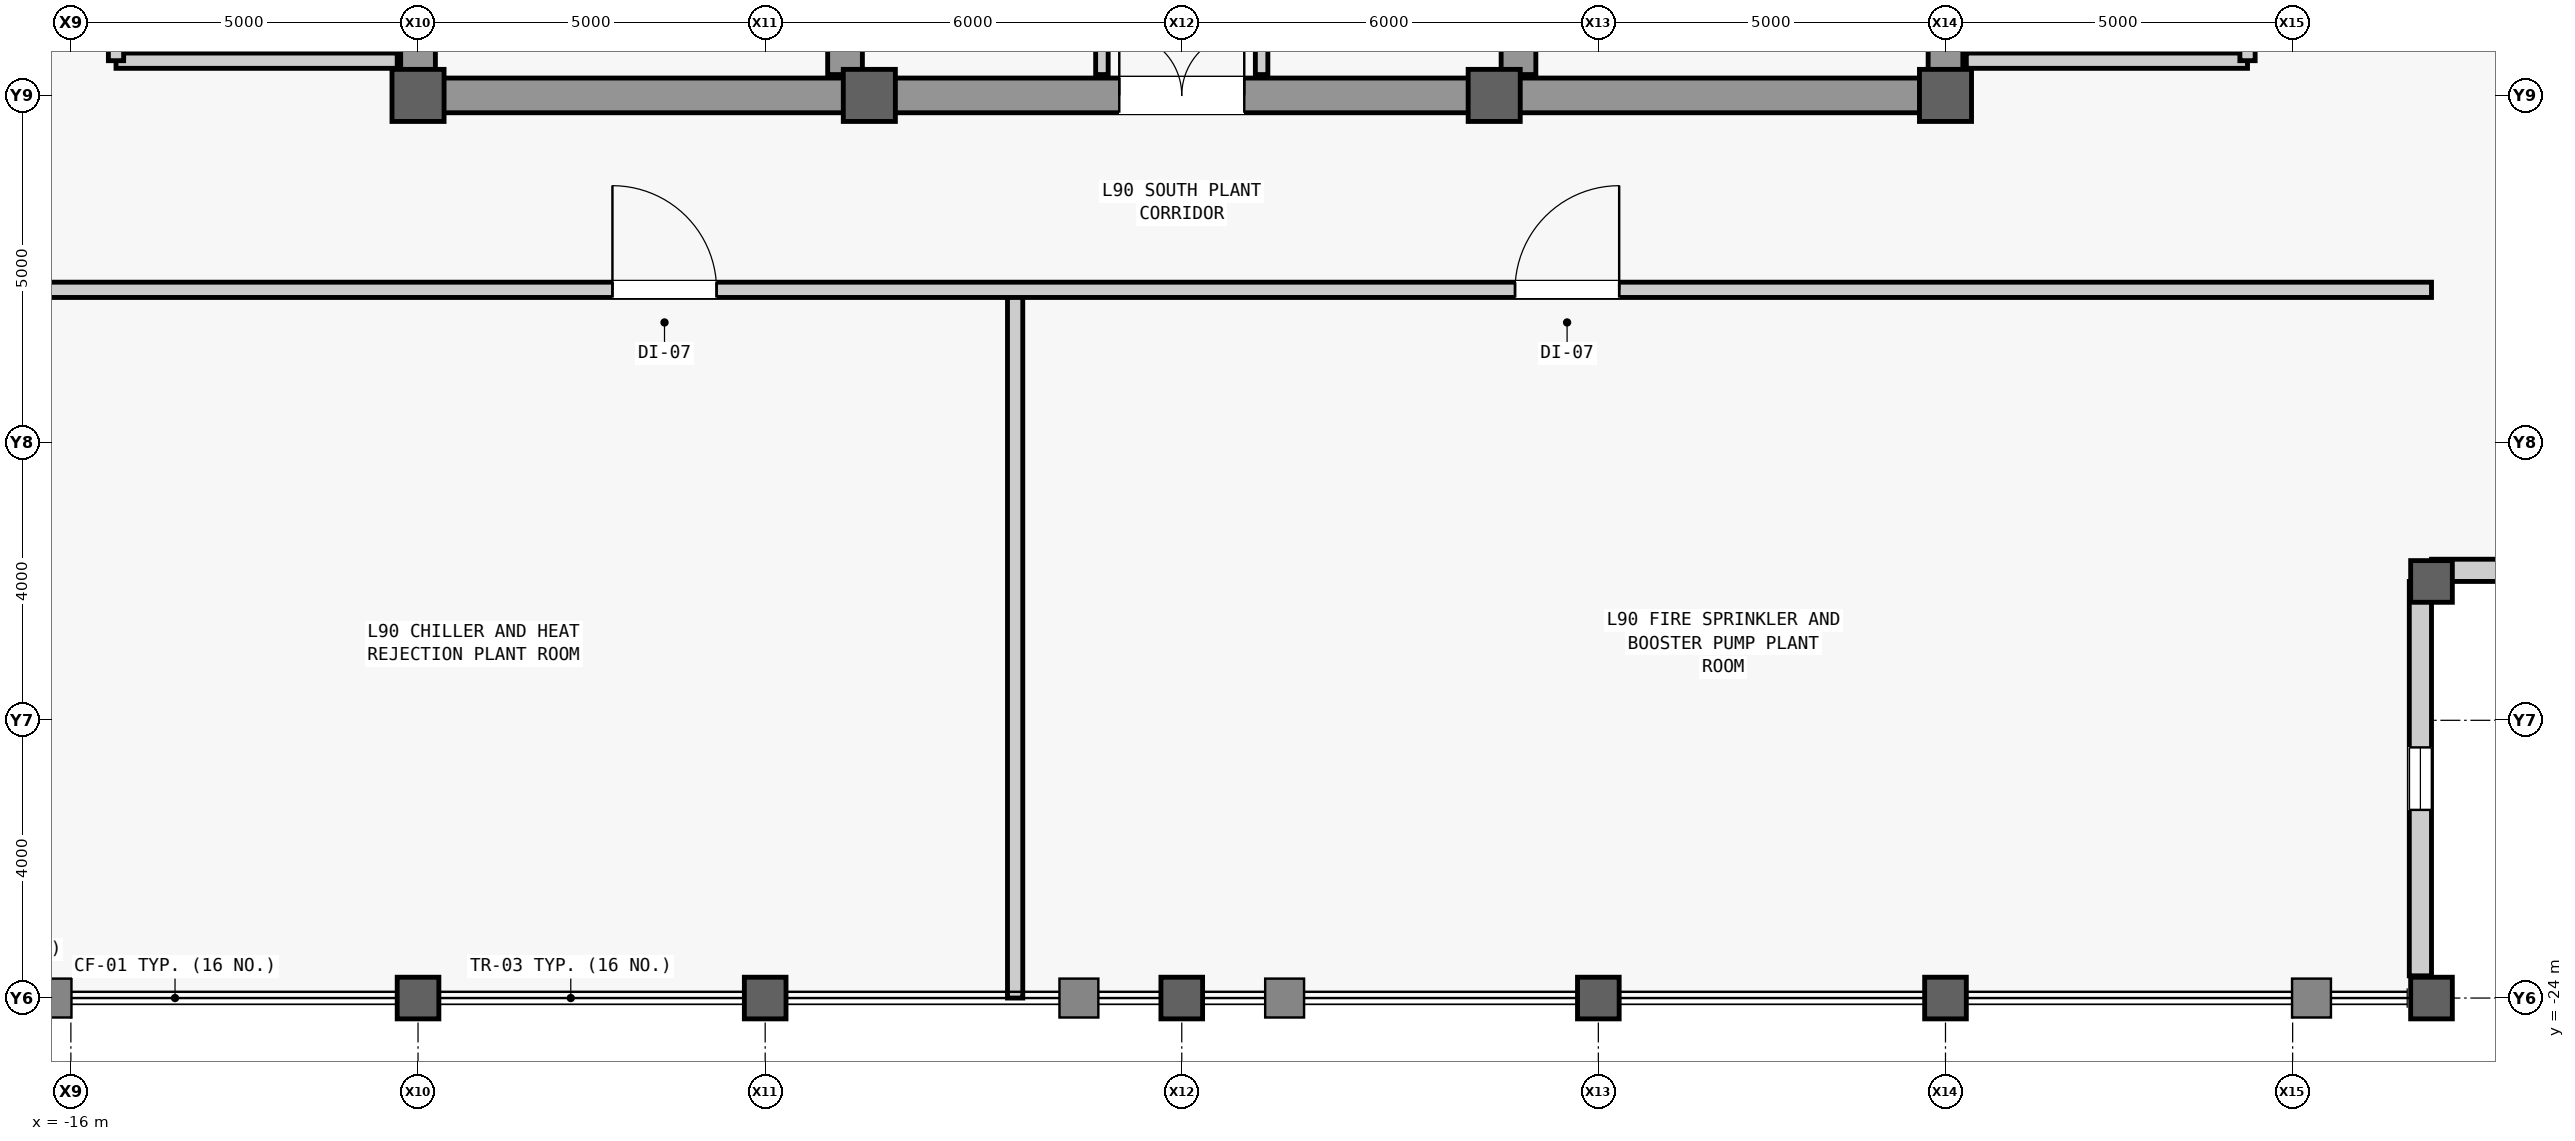
"""IFC4 building model, lengths in metres.
Left out: names, types, materials, properties, quantities, classifications, styles, units other than length and angle.
Written with IfcOpenShell. Run it as: python <this file> out.ifc"""

import sys

from ifc_helpers import new_model, si_unit, direction, frame, frame_2d, origin, origin_2d, place, context, subcontext, project, spatial, rectangle, hollow_rectangle, extrude, source, transform, mapped, element, fill, save


model = new_model("IFC4")
c1 = context("Model", 3, precision=1e-05, world=origin(), true_north=direction((0.0, 1.0)))
c2 = subcontext(c1, "Body", "Model", "MODEL_VIEW")
j1 = project(units=[si_unit("LENGTHUNIT", "METRE"), si_unit("PLANEANGLEUNIT", "RADIAN")], contexts=[c1])
p1 = place(None, origin())
s1 = spatial("IfcSite", under=j1, at=p1, CompositionType="ELEMENT")
p2 = place(p1, origin())
s2 = spatial("IfcBuilding", under=s1, at=p2, CompositionType="ELEMENT")
p3 = place(p2, frame((0.0, 0.0, 380.3)))
s3 = spatial("IfcBuildingStorey", under=s2, at=p3, CompositionType="ELEMENT", Elevation=380.3)
m1 = source(origin(), c2, "Body", "SweptSolid", [
    extrude(rectangle(XDim=22.0, YDim=0.5, at=frame_2d((11.0, 0.0))), origin(), (0.0, 0.0, 1.0), 4.45),
])
p4 = place(p3, frame((-11.0, -11.0, 0.0), z_axis=(0.0, 0.0, 1.0), x_axis=(0.0, 1.0, 0.0)))
e1 = element("IfcWall", 1, at=p4, inside=s3, PredefinedType="SHEAR", context=c2, shape_type="MappedRepresentation", body=[
    mapped(m1, transform((0.0, 0.0, 0.0), scale=1.0)),
])
m2 = source(origin(), c2, "Body", "SweptSolid", [
    extrude(rectangle(XDim=1.1, YDim=2.2, at=frame_2d((0.55, 1.1))), frame((0.0, 0.26, 0.0), z_axis=(0.0, -1.0, 0.0), x_axis=(1.0, 0.0, 0.0)), (0.0, 0.0, 1.0), 0.52),
])
p5 = place(p4, frame((0.8, 0.0, 0.0)))
e2 = element("IfcOpeningElement", 2, at=p5, cuts=e1, PredefinedType="OPENING", context=c2, shape_type="MappedRepresentation", body=[
    mapped(m2, transform((0.0, 0.0, 0.0), scale=1.0)),
])
p6 = place(p4, frame((12.5, 0.0, 0.0)))
e3 = element("IfcOpeningElement", 3, at=p6, cuts=e1, PredefinedType="OPENING", context=c2, shape_type="MappedRepresentation", body=[
    mapped(m2, transform((0.0, 0.0, 0.0), scale=1.0)),
])
m3 = source(origin(), c2, "Body", "SweptSolid", [
    extrude(rectangle(XDim=0.9, YDim=2.15, at=frame_2d((0.45, 1.075))), frame((0.0, 0.26, 0.0), z_axis=(0.0, -1.0, 0.0), x_axis=(1.0, 0.0, 0.0)), (0.0, 0.0, 1.0), 0.52),
])
p7 = place(p4, frame((7.575, 0.0, 0.0)))
e4 = element("IfcOpeningElement", 4, at=p7, cuts=e1, PredefinedType="OPENING", context=c2, shape_type="MappedRepresentation", body=[
    mapped(m3, transform((0.0, 0.0, 0.0), scale=1.0)),
])
m4 = source(origin(), c2, "Body", "SweptSolid", [
    extrude(rectangle(XDim=1.3, YDim=2.3, at=frame_2d((0.65, 1.15))), frame((0.0, 0.26, 0.0), z_axis=(0.0, -1.0, 0.0), x_axis=(1.0, 0.0, 0.0)), (0.0, 0.0, 1.0), 0.52),
])
p8 = place(p4, frame((2.7, 0.0, 0.0)))
e5 = element("IfcOpeningElement", 5, at=p8, cuts=e1, PredefinedType="OPENING", context=c2, shape_type="MappedRepresentation", body=[
    mapped(m4, transform((0.0, 0.0, 0.0), scale=1.0)),
])
p9 = place(p3, frame((11.0, -11.0, 0.0), z_axis=(0.0, 0.0, 1.0), x_axis=(0.0, 1.0, 0.0)))
e6 = element("IfcWall", 6, at=p9, inside=s3, PredefinedType="SHEAR", context=c2, shape_type="MappedRepresentation", body=[
    mapped(m1, transform((0.0, 0.0, 0.0), scale=1.0)),
])
p10 = place(p9, frame((0.8, 0.0, 0.0)))
e7 = element("IfcOpeningElement", 7, at=p10, cuts=e6, PredefinedType="OPENING", context=c2, shape_type="MappedRepresentation", body=[
    mapped(m2, transform((0.0, 0.0, 0.0), scale=1.0)),
])
p11 = place(p9, frame((7.575, 0.0, 0.0)))
e8 = element("IfcOpeningElement", 8, at=p11, cuts=e6, PredefinedType="OPENING", context=c2, shape_type="MappedRepresentation", body=[
    mapped(m3, transform((0.0, 0.0, 0.0), scale=1.0)),
])
p12 = place(p9, frame((2.7, 0.0, 0.0)))
e9 = element("IfcOpeningElement", 9, at=p12, cuts=e6, PredefinedType="OPENING", context=c2, shape_type="MappedRepresentation", body=[
    mapped(m4, transform((0.0, 0.0, 0.0), scale=1.0)),
])
p13 = place(p9, frame((13.35, 0.0, 0.0)))
e10 = element("IfcOpeningElement", 10, at=p13, cuts=e6, PredefinedType="OPENING", context=c2, shape_type="MappedRepresentation", body=[
    mapped(m4, transform((0.0, 0.0, 0.0), scale=1.0)),
])
m5 = source(origin(), c2, "Body", "SweptSolid", [
    extrude(rectangle(XDim=21.4, YDim=0.5, at=frame_2d((10.7, 0.0))), origin(), (0.0, 0.0, 1.0), 4.45),
])
for number, where, z_axis, x_axis in (
    (11, (-4.85, -10.7, 0.0), (0.0, 0.0, 1.0), (0.0, 1.0, 0.0)),
    (12, (4.85, -10.7, 0.0), (0.0, 0.0, 1.0), (0.0, 1.0, 0.0)),
):
    element("IfcWall", number, at=place(p3, frame(where, z_axis=z_axis, x_axis=x_axis)), inside=s3, PredefinedType="SHEAR", context=c2, shape_type="MappedRepresentation", body=[
        mapped(m5, transform((0.0, 0.0, 0.0), scale=1.0)),
    ])
m6 = source(origin(), c2, "Body", "SweptSolid", [
    extrude(rectangle(XDim=5.9, YDim=0.5, at=frame_2d((2.95, 0.0))), origin(), (0.0, 0.0, 1.0), 4.45),
])
for number, where, z_axis, x_axis in (
    (13, (-10.75, -11.0, 0.0), (0.0, 0.0, 1.0), (1.0, 0.0, 0.0)),
    (14, (4.85, -11.0, 0.0), (0.0, 0.0, 1.0), (1.0, 0.0, 0.0)),
):
    element("IfcWall", number, at=place(p3, frame(where, z_axis=z_axis, x_axis=x_axis)), inside=s3, PredefinedType="SHEAR", context=c2, shape_type="MappedRepresentation", body=[
        mapped(m6, transform((0.0, 0.0, 0.0), scale=1.0)),
    ])
m7 = source(origin(), c2, "Body", "SweptSolid", [
    extrude(rectangle(XDim=9.2, YDim=0.5, at=frame_2d((4.6, 0.0))), origin(), (0.0, 0.0, 1.0), 4.45),
])
p14 = place(p3, frame((-4.6, -11.0, 0.0), z_axis=(0.0, 0.0, 1.0), x_axis=(1.0, 0.0, 0.0)))
e15 = element("IfcWall", 15, at=p14, inside=s3, PredefinedType="SHEAR", context=c2, shape_type="MappedRepresentation", body=[
    mapped(m7, transform((0.0, 0.0, 0.0), scale=1.0)),
])
m8 = source(origin(), c2, "Body", "SweptSolid", [
    extrude(rectangle(XDim=1.8, YDim=2.25, at=frame_2d((0.9, 1.125))), frame((0.0, 0.26, 0.0), z_axis=(0.0, -1.0, 0.0), x_axis=(1.0, 0.0, 0.0)), (0.0, 0.0, 1.0), 0.52),
])
p15 = place(p14, frame((3.7, 0.0, 0.0)))
e16 = element("IfcOpeningElement", 16, at=p15, cuts=e15, PredefinedType="OPENING", context=c2, shape_type="MappedRepresentation", body=[
    mapped(m8, transform((0.0, 0.0, 0.0), scale=1.0)),
])
m9 = source(origin(), c2, "Body", "SweptSolid", [
    extrude(hollow_rectangle(XDim=0.6, YDim=0.6, WallThickness=0.035, at=origin_2d()), origin(), (0.0, 0.0, 1.0), 4.8),
])
p16 = place(p3, frame((-11.0, -24.0, 0.0), z_axis=(0.0, 0.0, 1.0), x_axis=(1.0, 0.0, 0.0)))
e17 = element("IfcColumn", 17, at=p16, inside=s3, PredefinedType="COLUMN", context=c2, shape_type="MappedRepresentation", body=[
    mapped(m9, transform((0.0, 0.0, 0.0), scale=1.0)),
])
m10 = source(origin(), c2, "Body", "SweptSolid", [
    extrude(rectangle(XDim=0.75, YDim=0.75, at=origin_2d()), origin(), (0.0, 0.0, 1.0), 4.8),
])
p17 = place(p3, frame((-11.0, -11.0, 0.0), z_axis=(0.0, 0.0, 1.0), x_axis=(1.0, 0.0, 0.0)))
e18 = element("IfcColumn", 18, at=p17, inside=s3, PredefinedType="COLUMN", context=c2, shape_type="MappedRepresentation", body=[
    mapped(m10, transform((0.0, 0.0, 0.0), scale=1.0)),
])
p18 = place(p3, frame((-6.0, -24.0, 0.0), z_axis=(0.0, 0.0, 1.0), x_axis=(1.0, 0.0, 0.0)))
e19 = element("IfcColumn", 19, at=p18, inside=s3, PredefinedType="COLUMN", context=c2, shape_type="MappedRepresentation", body=[
    mapped(m9, transform((0.0, 0.0, 0.0), scale=1.0)),
])
p19 = place(p3, frame((-4.5, -11.0, 0.0), z_axis=(0.0, 0.0, 1.0), x_axis=(1.0, 0.0, 0.0)))
e20 = element("IfcColumn", 20, at=p19, inside=s3, PredefinedType="COLUMN", context=c2, shape_type="MappedRepresentation", body=[
    mapped(m10, transform((0.0, 0.0, 0.0), scale=1.0)),
])
p20 = place(p3, frame((0.0, -24.0, 0.0), z_axis=(0.0, 0.0, 1.0), x_axis=(1.0, 0.0, 0.0)))
e21 = element("IfcColumn", 21, at=p20, inside=s3, PredefinedType="COLUMN", context=c2, shape_type="MappedRepresentation", body=[
    mapped(m9, transform((0.0, 0.0, 0.0), scale=1.0)),
])
p21 = place(p3, frame((4.5, -11.0, 0.0), z_axis=(0.0, 0.0, 1.0), x_axis=(1.0, 0.0, 0.0)))
e22 = element("IfcColumn", 22, at=p21, inside=s3, PredefinedType="COLUMN", context=c2, shape_type="MappedRepresentation", body=[
    mapped(m10, transform((0.0, 0.0, 0.0), scale=1.0)),
])
for number, where, z_axis, x_axis in (
    (23, (6.0, -24.0, 0.0), (0.0, 0.0, 1.0), (1.0, 0.0, 0.0)),
    (24, (11.0, -24.0, 0.0), (0.0, 0.0, 1.0), (1.0, 0.0, 0.0)),
):
    element("IfcColumn", number, at=place(p3, frame(where, z_axis=z_axis, x_axis=x_axis)), inside=s3, PredefinedType="COLUMN", context=c2, shape_type="MappedRepresentation", body=[
        mapped(m9, transform((0.0, 0.0, 0.0), scale=1.0)),
    ])
p22 = place(p3, frame((11.0, -11.0, 0.0), z_axis=(0.0, 0.0, 1.0), x_axis=(1.0, 0.0, 0.0)))
e25 = element("IfcColumn", 25, at=p22, inside=s3, PredefinedType="COLUMN", context=c2, shape_type="MappedRepresentation", body=[
    mapped(m10, transform((0.0, 0.0, 0.0), scale=1.0)),
])
for number, where, z_axis, x_axis in (
    (26, (18.0, -24.0, 0.0), (0.0, 0.0, 1.0), (1.0, 0.0, 0.0)),
    (27, (18.0, -18.0, 0.0), (0.0, 0.0, 1.0), (1.0, 0.0, 0.0)),
):
    element("IfcColumn", number, at=place(p3, frame(where, z_axis=z_axis, x_axis=x_axis)), inside=s3, PredefinedType="COLUMN", context=c2, shape_type="MappedRepresentation", body=[
        mapped(m9, transform((0.0, 0.0, 0.0), scale=1.0)),
    ])
m11 = source(origin(), c2, "Body", "SweptSolid", [
    extrude(rectangle(XDim=5.68, YDim=0.32, at=frame_2d((2.84, 0.0))), origin(), (0.0, 0.0, 1.0), 3.901),
])
p23 = place(p3, frame((17.84, -23.68, 0.0), z_axis=(0.0, 0.0, 1.0), x_axis=(0.0, 1.0, 0.0)))
e28 = element("IfcWall", 28, at=p23, inside=s3, PredefinedType="STANDARD", context=c2, shape_type="MappedRepresentation", body=[
    mapped(m11, transform((0.0, 0.0, 0.0), scale=1.0)),
])
m12 = source(origin(), c2, "Body", "SweptSolid", [
    extrude(rectangle(XDim=0.9, YDim=2.4, at=frame_2d((0.45, 1.2))), frame((0.0, 0.17, 0.0), z_axis=(0.0, -1.0, 0.0), x_axis=(1.0, 0.0, 0.0)), (0.0, 0.0, 1.0), 0.34),
])
p24 = place(p23, frame((2.39, 0.0, 0.7)))
e29 = element("IfcOpeningElement", 29, at=p24, cuts=e28, PredefinedType="OPENING", context=c2, shape_type="MappedRepresentation", body=[
    mapped(m12, transform((0.0, 0.0, 0.0), scale=1.0)),
])
p25 = place(p3, frame((18.0, -17.84, 0.0), z_axis=(0.0, 0.0, 1.0), x_axis=(1.0, 0.0, 0.0)))
e30 = element("IfcWall", 30, at=p25, inside=s3, PredefinedType="STANDARD", context=c2, shape_type="MappedRepresentation", body=[
    mapped(m11, transform((0.0, 0.0, 0.0), scale=1.0)),
])
p26 = place(p25, frame((2.39, 0.0, 0.7)))
e31 = element("IfcOpeningElement", 31, at=p26, cuts=e30, PredefinedType="OPENING", context=c2, shape_type="MappedRepresentation", body=[
    mapped(m12, transform((0.0, 0.0, 0.0), scale=1.0)),
])
m13 = source(origin(), c2, "Body", "SweptSolid", [
    extrude(rectangle(XDim=4.05, YDim=0.22, at=frame_2d((2.025, 0.0))), origin(), (0.0, 0.0, 1.0), 4.45),
])
p27 = place(p3, frame((-15.35, -10.5, 0.0), z_axis=(0.0, 0.0, 1.0), x_axis=(1.0, 0.0, 0.0)))
e32 = element("IfcWall", 32, at=p27, inside=s3, PredefinedType="PARTITIONING", context=c2, shape_type="MappedRepresentation", body=[
    mapped(m13, transform((0.0, 0.0, 0.0), scale=1.0)),
])
m14 = source(origin(), c2, "Body", "SweptSolid", [
    extrude(rectangle(XDim=4.4, YDim=0.22, at=frame_2d((2.2, 0.0))), origin(), (0.0, 0.0, 1.0), 4.45),
])
p28 = place(p3, frame((-15.35, -10.5, 0.0), z_axis=(0.0, 0.0, 1.0), x_axis=(0.0, 1.0, 0.0)))
e33 = element("IfcWall", 33, at=p28, inside=s3, PredefinedType="PARTITIONING", context=c2, shape_type="MappedRepresentation", body=[
    mapped(m14, transform((0.0, 0.0, 0.0), scale=1.0)),
])
m15 = source(origin(), c2, "Body", "SweptSolid", [
    extrude(rectangle(XDim=1.2, YDim=2.2, at=frame_2d((0.6, 1.1))), frame((0.0, 0.12, 0.0), z_axis=(0.0, -1.0, 0.0), x_axis=(1.0, 0.0, 0.0)), (0.0, 0.0, 1.0), 0.24),
])
p29 = place(p28, frame((1.6, 0.0, 0.0)))
e34 = element("IfcOpeningElement", 34, at=p29, cuts=e33, PredefinedType="OPENING", context=c2, shape_type="MappedRepresentation", body=[
    mapped(m15, transform((0.0, 0.0, 0.0), scale=1.0)),
])
p30 = place(p3, frame((11.3, -10.5, 0.0), z_axis=(0.0, 0.0, 1.0), x_axis=(1.0, 0.0, 0.0)))
e35 = element("IfcWall", 35, at=p30, inside=s3, PredefinedType="PARTITIONING", context=c2, shape_type="MappedRepresentation", body=[
    mapped(m13, transform((0.0, 0.0, 0.0), scale=1.0)),
])
p31 = place(p3, frame((15.35, -10.5, 0.0), z_axis=(0.0, 0.0, 1.0), x_axis=(0.0, 1.0, 0.0)))
e36 = element("IfcWall", 36, at=p31, inside=s3, PredefinedType="PARTITIONING", context=c2, shape_type="MappedRepresentation", body=[
    mapped(m14, transform((0.0, 0.0, 0.0), scale=1.0)),
])
p32 = place(p31, frame((1.6, 0.0, 0.0)))
e37 = element("IfcOpeningElement", 37, at=p32, cuts=e36, PredefinedType="OPENING", context=c2, shape_type="MappedRepresentation", body=[
    mapped(m15, transform((0.0, 0.0, 0.0), scale=1.0)),
])
m16 = source(origin(), c2, "Body", "SweptSolid", [
    extrude(rectangle(XDim=5.4, YDim=0.18, at=frame_2d((2.7, 0.0))), origin(), (0.0, 0.0, 1.0), 4.45),
])
p33 = place(p3, frame((-1.15, -10.7, 0.0), z_axis=(0.0, 0.0, 1.0), x_axis=(0.0, 1.0, 0.0)))
e38 = element("IfcWall", 38, at=p33, inside=s3, PredefinedType="PARTITIONING", context=c2, shape_type="MappedRepresentation", body=[
    mapped(m16, transform((0.0, 0.0, 0.0), scale=1.0)),
])
m17 = source(origin(), c2, "Body", "SweptSolid", [
    extrude(rectangle(XDim=0.9, YDim=2.15, at=frame_2d((0.45, 1.075))), frame((0.0, 0.1, 0.0), z_axis=(0.0, -1.0, 0.0), x_axis=(1.0, 0.0, 0.0)), (0.0, 0.0, 1.0), 0.2),
])
p34 = place(p33, frame((1.15, 0.0, 0.0)))
e39 = element("IfcOpeningElement", 39, at=p34, cuts=e38, PredefinedType="OPENING", context=c2, shape_type="MappedRepresentation", body=[
    mapped(m17, transform((0.0, 0.0, 0.0), scale=1.0)),
])
p35 = place(p33, frame((3.85, 0.0, 0.0)))
e40 = element("IfcOpeningElement", 40, at=p35, cuts=e38, PredefinedType="OPENING", context=c2, shape_type="MappedRepresentation", body=[
    mapped(m17, transform((0.0, 0.0, 0.0), scale=1.0)),
])
p36 = place(p3, frame((1.15, -10.7, 0.0), z_axis=(0.0, 0.0, 1.0), x_axis=(0.0, 1.0, 0.0)))
e41 = element("IfcWall", 41, at=p36, inside=s3, PredefinedType="PARTITIONING", context=c2, shape_type="MappedRepresentation", body=[
    mapped(m16, transform((0.0, 0.0, 0.0), scale=1.0)),
])
p37 = place(p36, frame((2.25, 0.0, 0.0)))
e42 = element("IfcOpeningElement", 42, at=p37, cuts=e41, PredefinedType="OPENING", context=c2, shape_type="MappedRepresentation", body=[
    mapped(m17, transform((0.0, 0.0, 0.0), scale=1.0)),
])
m18 = source(origin(), c2, "Body", "SweptSolid", [
    extrude(rectangle(XDim=10.2, YDim=0.22, at=frame_2d((5.1, 0.0))), origin(), (0.0, 0.0, 1.0), 4.45),
])
p38 = place(p3, frame((-2.4, -24.0, 0.0), z_axis=(0.0, 0.0, 1.0), x_axis=(0.0, 1.0, 0.0)))
e43 = element("IfcWall", 43, at=p38, inside=s3, PredefinedType="PARTITIONING", context=c2, shape_type="MappedRepresentation", body=[
    mapped(m18, transform((0.0, 0.0, 0.0), scale=1.0)),
])
m19 = source(origin(), c2, "Body", "SweptSolid", [
    extrude(rectangle(XDim=36.0, YDim=0.22, at=frame_2d((18.0, 0.0))), origin(), (0.0, 0.0, 1.0), 4.45),
])
p39 = place(p3, frame((-18.0, -13.8, 0.0), z_axis=(0.0, 0.0, 1.0), x_axis=(1.0, 0.0, 0.0)))
e44 = element("IfcWall", 44, at=p39, inside=s3, PredefinedType="PARTITIONING", context=c2, shape_type="MappedRepresentation", body=[
    mapped(m19, transform((0.0, 0.0, 0.0), scale=1.0)),
])
m20 = source(origin(), c2, "Body", "SweptSolid", [
    extrude(rectangle(XDim=1.5, YDim=2.3, at=frame_2d((0.75, 1.15))), frame((0.0, 0.12, 0.0), z_axis=(0.0, -1.0, 0.0), x_axis=(1.0, 0.0, 0.0)), (0.0, 0.0, 1.0), 0.24),
])
p40 = place(p39, frame((9.8, 0.0, 0.0)))
e45 = element("IfcOpeningElement", 45, at=p40, cuts=e44, PredefinedType="OPENING", context=c2, shape_type="MappedRepresentation", body=[
    mapped(m20, transform((0.0, 0.0, 0.0), scale=1.0)),
])
p41 = place(p39, frame((22.8, 0.0, 0.0)))
e46 = element("IfcOpeningElement", 46, at=p41, cuts=e44, PredefinedType="OPENING", context=c2, shape_type="MappedRepresentation", body=[
    mapped(m20, transform((0.0, 0.0, 0.0), scale=1.0)),
])
m21 = source(origin(), c2, "Body", "SweptSolid", [
    extrude(rectangle(XDim=0.9, YDim=2.4, at=frame_2d((0.45, 1.2))), frame((0.0, 0.03, 0.0), z_axis=(0.0, -1.0, 0.0), x_axis=(1.0, 0.0, 0.0)), (0.0, 0.0, 1.0), 0.06),
])
p42 = place(p24, origin())
e47 = element("IfcWindow", 47, at=p42, inside=s3, PartitioningType="SINGLE_PANEL", PredefinedType="WINDOW", context=c2, shape_type="MappedRepresentation", body=[
    mapped(m21, transform((0.0, 0.0, 0.0), scale=1.0)),
])
fill(e29, e47)
m22 = source(origin(), c2, "Body", "SweptSolid", [
    extrude(rectangle(XDim=1.8, YDim=2.25, at=frame_2d((0.9, 1.125))), frame((0.0, 0.025, 0.0), z_axis=(0.0, -1.0, 0.0), x_axis=(1.0, 0.0, 0.0)), (0.0, 0.0, 1.0), 0.05),
])
p43 = place(p15, origin())
e48 = element("IfcDoor", 48, at=p43, inside=s3, OperationType="SINGLE_SWING_LEFT", PredefinedType="DOOR", context=c2, shape_type="MappedRepresentation", body=[
    mapped(m22, transform((0.0, 0.0, 0.0), scale=1.0)),
])
fill(e16, e48)
m23 = source(origin(), c2, "Body", "SweptSolid", [
    extrude(rectangle(XDim=1.5, YDim=2.3, at=frame_2d((0.75, 1.15))), frame((0.0, 0.025, 0.0), z_axis=(0.0, -1.0, 0.0), x_axis=(1.0, 0.0, 0.0)), (0.0, 0.0, 1.0), 0.05),
])
p44 = place(p40, origin())
e49 = element("IfcDoor", 49, at=p44, inside=s3, OperationType="SINGLE_SWING_LEFT", PredefinedType="DOOR", context=c2, shape_type="MappedRepresentation", body=[
    mapped(m23, transform((0.0, 0.0, 0.0), scale=1.0)),
])
fill(e45, e49)
p45 = place(p41, origin())
e50 = element("IfcDoor", 50, at=p45, inside=s3, OperationType="SINGLE_SWING_RIGHT", PredefinedType="DOOR", context=c2, shape_type="MappedRepresentation", body=[
    mapped(m23, transform((0.0, 0.0, 0.0), scale=1.0)),
])
fill(e46, e50)
save(model, sys.argv[1])
